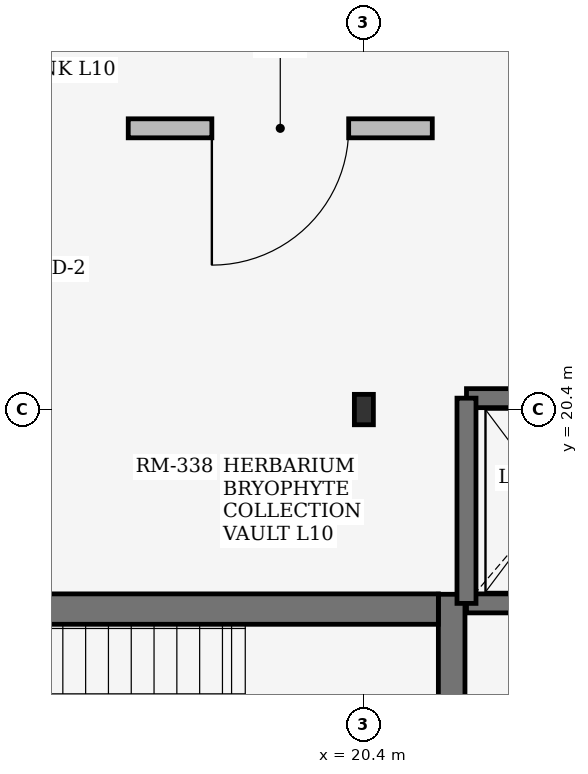
"""IFC4 building model, lengths in metres.
Left out: names, types, materials, properties, quantities, classifications, styles, units other than length and angle.
Written with IfcOpenShell. Run it as: python <this file> out.ifc"""

import sys

from ifc_helpers import new_model, si_unit, direction, frame, frame_2d, origin, origin_2d, place, context, subcontext, project, spatial, rectangle, i_section, extrude, element, fill, save


model = new_model("IFC4")
c1 = context("Model", 3, precision=1e-05, world=origin(), true_north=direction((0.0, 1.0)))
c2 = subcontext(c1, "Body", "Model", "MODEL_VIEW")
j1 = project(units=[si_unit("LENGTHUNIT", "METRE"), si_unit("PLANEANGLEUNIT", "RADIAN")], contexts=[c1])
p1 = place(None, origin())
s1 = spatial("IfcSite", under=j1, at=p1, CompositionType="ELEMENT")
p2 = place(p1, origin())
s2 = spatial("IfcBuilding", under=s1, at=p2, CompositionType="ELEMENT")
p3 = place(p2, frame((0.0, 0.0, 40.5)))
s3 = spatial("IfcBuildingStorey", under=s2, at=p3, CompositionType="ELEMENT", Elevation=40.5)
p4 = place(p3, frame((20.4, 20.4, 0.0), z_axis=(0.0, 0.0, 1.0), x_axis=(1.0, 0.0, 0.0)))
e1 = element("IfcColumn", 1, at=p4, inside=s3, PredefinedType="COLUMN", context=c2, shape_type="SweptSolid", body=[
    extrude(i_section(OverallWidth=0.25, OverallDepth=0.4, WebThickness=0.01, FlangeThickness=0.013, at=origin_2d()), origin(), (0.0, 0.0, 1.0), 3.68),
])
p5 = place(p3, frame((21.555, 13.38, 0.0), z_axis=(0.0, 0.0, 1.0), x_axis=(0.0, 1.0, 0.0)))
e2 = element("IfcWall", 2, at=p5, inside=s3, PredefinedType="SHEAR", context=c2, shape_type="SweptSolid", body=[
    extrude(rectangle(XDim=4.59, YDim=0.35, at=frame_2d((2.295, 0.0))), origin(), (0.0, 0.0, 1.0), 3.68),
])
p6 = place(p3, frame((13.4, 17.775, 0.0), z_axis=(0.0, 0.0, 1.0), x_axis=(1.0, 0.0, 0.0)))
e3 = element("IfcWall", 3, at=p6, inside=s3, PredefinedType="SHEAR", context=c2, shape_type="SweptSolid", body=[
    extrude(rectangle(XDim=7.98, YDim=0.4, at=frame_2d((3.99, 0.0))), origin(), (0.0, 0.0, 1.0), 3.68),
])
p7 = place(p3, frame((21.75, 17.85, 0.0), z_axis=(0.0, 0.0, 1.0), x_axis=(1.0, 0.0, 0.0)))
e4 = element("IfcWall", 4, at=p7, inside=s3, PredefinedType="SHEAR", context=c2, shape_type="SweptSolid", body=[
    extrude(rectangle(XDim=2.3, YDim=0.25, at=frame_2d((1.15, 0.0))), origin(), (0.0, 0.0, 1.0), 3.68),
])
p8 = place(p7, frame((0.6, 0.0, 0.0)))
e5 = element("IfcOpeningElement", 5, at=p8, cuts=e4, PredefinedType="OPENING", context=c2, shape_type="SweptSolid", body=[
    extrude(rectangle(XDim=1.1, YDim=2.2, at=frame_2d((0.55, 1.1))), frame((0.0, 0.135, 0.0), z_axis=(0.0, -1.0, 0.0), x_axis=(1.0, 0.0, 0.0)), (0.0, 0.0, 1.0), 0.27),
])
p9 = place(p3, frame((21.75, 20.55, 0.0), z_axis=(0.0, 0.0, 1.0), x_axis=(1.0, 0.0, 0.0)))
e6 = element("IfcWall", 6, at=p9, inside=s3, PredefinedType="SHEAR", context=c2, shape_type="SweptSolid", body=[
    extrude(rectangle(XDim=2.3, YDim=0.25, at=frame_2d((1.15, 0.0))), origin(), (0.0, 0.0, 1.0), 3.68),
])
p10 = place(p3, frame((21.75, 17.85, 0.0), z_axis=(0.0, 0.0, 1.0), x_axis=(0.0, 1.0, 0.0)))
e7 = element("IfcWall", 7, at=p10, inside=s3, PredefinedType="SHEAR", context=c2, shape_type="SweptSolid", body=[
    extrude(rectangle(XDim=2.7, YDim=0.25, at=frame_2d((1.35, 0.0))), origin(), (0.0, 0.0, 1.0), 3.68),
])
p11 = place(p3, frame((17.3, 24.1, 0.0), z_axis=(0.0, 0.0, 1.0), x_axis=(1.0, 0.0, 0.0)))
e8 = element("IfcWall", 8, at=p11, inside=s3, PredefinedType="SOLIDWALL", context=c2, shape_type="SweptSolid", body=[
    extrude(rectangle(XDim=4.0, YDim=0.25, at=frame_2d((2.0, 0.0))), origin(), (0.0, 0.0, 1.0), 3.66),
])
p12 = place(p11, frame((1.1, 0.0, 0.0)))
e9 = element("IfcOpeningElement", 9, at=p12, cuts=e8, PredefinedType="OPENING", context=c2, shape_type="SweptSolid", body=[
    extrude(rectangle(XDim=1.8, YDim=2.25, at=frame_2d((0.9, 1.125))), frame((0.0, 0.135, 0.0), z_axis=(0.0, -1.0, 0.0), x_axis=(1.0, 0.0, 0.0)), (0.0, 0.0, 1.0), 0.27),
])
p13 = place(p12, frame((1.8, 0.0, 0.0), z_axis=(0.0, 0.0, 1.0), x_axis=(-1.0, 0.0, 0.0)))
e10 = element("IfcDoor", 10, at=p13, inside=s3, OperationType="DOUBLE_DOOR_SINGLE_SWING", PredefinedType="DOOR", context=c2, shape_type="SweptSolid", body=[
    extrude(rectangle(XDim=1.8, YDim=2.25, at=frame_2d((0.9, 1.125))), frame((0.0, 0.025, 0.0), z_axis=(0.0, -1.0, 0.0), x_axis=(1.0, 0.0, 0.0)), (0.0, 0.0, 1.0), 0.05),
])
fill(e9, e10)
save(model, sys.argv[1])
